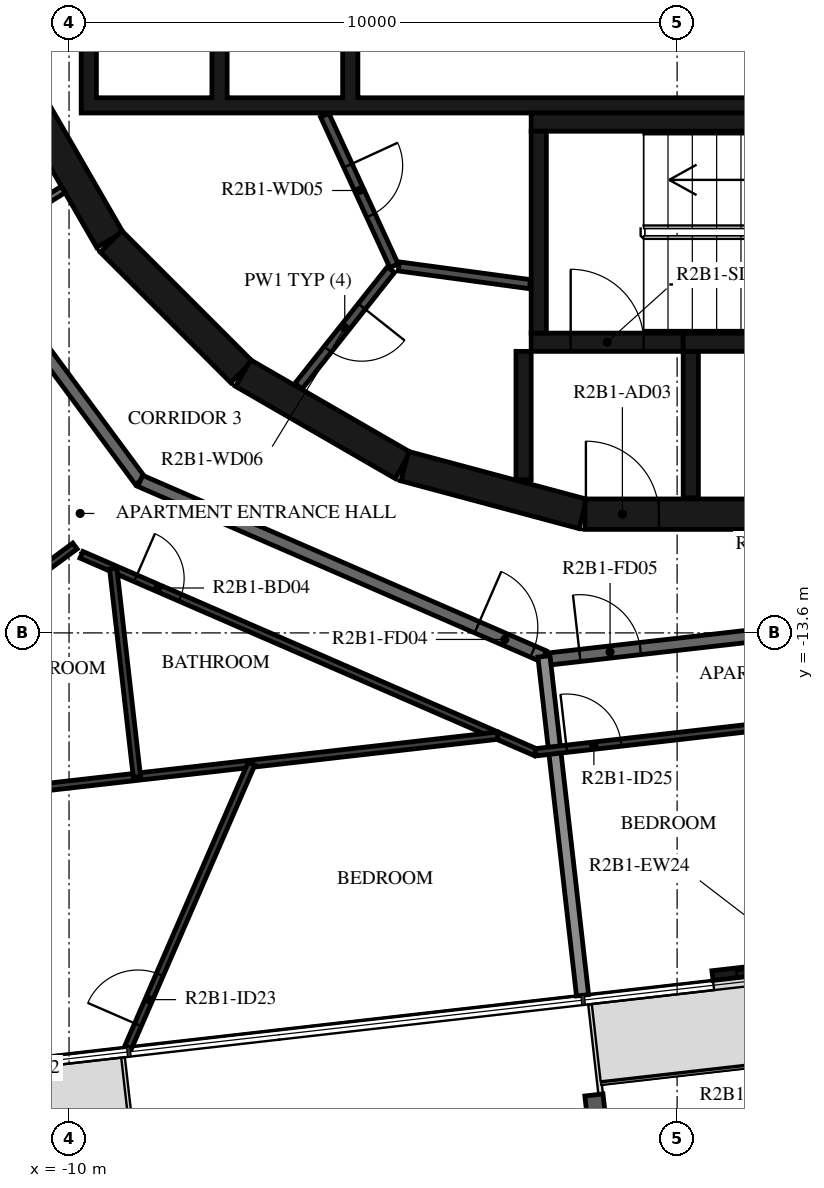
"""IFC4 building model, lengths in metres.
Left out: names, types, materials, properties, quantities, classifications, styles, units other than length and angle.
Written with IfcOpenShell. Run it as: python <this file> out.ifc"""

import sys

from ifc_helpers import new_model, si_unit, direction, frame, frame_2d, origin, origin_2d, place, context, subcontext, project, spatial, polyline, rectangle, i_section, outline, extrude, element, fill, save


model = new_model("IFC4")
c1 = context("Model", 3, precision=1e-05, world=origin(), true_north=direction((0.0, 1.0)))
c2 = subcontext(c1, "Body", "Model", "MODEL_VIEW")
j1 = project(units=[si_unit("LENGTHUNIT", "METRE"), si_unit("PLANEANGLEUNIT", "RADIAN")], contexts=[c1])
p1 = place(None, origin())
s1 = spatial("IfcSite", under=j1, at=p1, CompositionType="ELEMENT")
p2 = place(p1, origin())
s2 = spatial("IfcBuilding", under=s1, at=p2, CompositionType="ELEMENT")
p3 = place(p2, frame((0.0, 0.0, 87.2)))
s3 = spatial("IfcBuildingStorey", under=s2, at=p3, CompositionType="ELEMENT", Elevation=87.2)
p4 = place(p3, frame((-1.317, -21.646, -0.38), z_axis=(0.0, 0.0, 1.0), x_axis=(-0.993571881569, -0.113202986513, 0.0)))
e1 = element("IfcColumn", 1, at=p4, inside=s3, PredefinedType="COLUMN", context=c2, shape_type="SweptSolid", body=[
    extrude(i_section(OverallWidth=0.3, OverallDepth=0.9, WebThickness=0.019, FlangeThickness=0.035, FilletRadius=0.03, at=origin_2d()), origin(), (0.0, 0.0, 1.0), 3.5),
])
p5 = place(p3, frame((0.581, -19.235, 0.0), z_axis=(0.0, 0.0, 1.0), x_axis=(0.993569997097, 0.113219525124, 0.0)))
e2 = element("IfcWall", 2, at=p5, inside=s3, PredefinedType="STANDARD", context=c2, shape_type="SweptSolid", body=[
    extrude(rectangle(XDim=3.2, YDim=0.16, at=frame_2d((1.6, 0.0))), origin(), (0.0, 0.0, 1.0), 3.12),
])
p6 = place(p5, frame((0.4, 0.0, 0.0)))
e3 = element("IfcOpeningElement", 3, at=p6, cuts=e2, PredefinedType="OPENING", context=c2, shape_type="SweptSolid", body=[
    extrude(rectangle(XDim=2.4, YDim=2.4, at=frame_2d((1.2, 1.2))), frame((0.0, 0.09, 0.0), z_axis=(0.0, -1.0, 0.0), x_axis=(1.0, 0.0, 0.0)), (0.0, 0.0, 1.0), 0.18),
])
p7 = place(p3, frame((-10.845, -4.51, 0.0), z_axis=(0.0, 0.0, 1.0), x_axis=(0.500087131594, -0.865975092491, 0.0)))
e4 = element("IfcWall", 4, at=p7, inside=s3, PredefinedType="SHEAR", context=c2, shape_type="SweptSolid", body=[
    extrude(rectangle(XDim=3.033, YDim=0.5, at=frame_2d((1.516, 0.0))), origin(), (0.0, 0.0, 1.0), 3.12),
])
p8 = place(p3, frame((-9.308, -7.164, 0.0), z_axis=(0.0, 0.0, 1.0), x_axis=(0.707106781187, -0.707106781187, 0.0)))
e5 = element("IfcWall", 5, at=p8, inside=s3, PredefinedType="SHEAR", context=c2, shape_type="SweptSolid", body=[
    extrude(rectangle(XDim=3.032, YDim=0.5, at=frame_2d((1.516, 0.0))), origin(), (0.0, 0.0, 1.0), 3.12),
])
for number, where, z_axis, x_axis in (
    (6, (-7.137, -9.329, 0.0), (0.0, 0.0, 1.0), (0.866, -0.5, 0.0)),
    (7, (-4.479, -10.858, 0.0), (0.0, 0.0, 1.0), (0.966, -0.259, 0.0)),
):
    element("IfcWall", number, at=place(p3, frame(where, z_axis=z_axis, x_axis=x_axis)), inside=s3, PredefinedType="SHEAR", context=c2, shape_type="SweptSolid", body=[
        extrude(rectangle(XDim=3.033, YDim=0.5, at=frame_2d((1.516, 0.0))), origin(), (0.0, 0.0, 1.0), 3.12),
    ])
p9 = place(p3, frame((-1.516, -11.647, 0.0), z_axis=(0.0, 0.0, 1.0), x_axis=(1.0, 0.0, 0.0)))
e8 = element("IfcWall", 8, at=p9, inside=s3, PredefinedType="SHEAR", context=c2, shape_type="SweptSolid", body=[
    extrude(rectangle(XDim=3.033, YDim=0.5, at=frame_2d((1.516, 0.0))), origin(), (0.0, 0.0, 1.0), 3.12),
])
p10 = place(p9, frame((0.016, 0.0, 0.0)))
e9 = element("IfcOpeningElement", 9, at=p10, cuts=e8, PredefinedType="OPENING", context=c2, shape_type="SweptSolid", body=[
    extrude(rectangle(XDim=1.2, YDim=2.1, at=frame_2d((0.6, 1.05))), frame((0.0, 0.26, 0.0), z_axis=(0.0, -1.0, 0.0), x_axis=(1.0, 0.0, 0.0)), (0.0, 0.0, 1.0), 0.52),
])
p11 = place(p3, frame((-2.275, -8.67, 0.0), z_axis=(0.0, 0.0, 1.0), x_axis=(0.0, 1.0, 0.0)))
e10 = element("IfcWall", 10, at=p11, inside=s3, PredefinedType="SHEAR", context=c2, shape_type="SweptSolid", body=[
    extrude(rectangle(XDim=3.32, YDim=0.25, at=frame_2d((1.66, 0.0))), origin(), (0.0, 0.0, 1.0), 3.12),
])
p12 = place(p3, frame((-2.4, -5.2, 0.0), z_axis=(0.0, 0.0, 1.0), x_axis=(1.0, 0.0, 0.0)))
e11 = element("IfcWall", 11, at=p12, inside=s3, PredefinedType="SHEAR", context=c2, shape_type="SweptSolid", body=[
    extrude(rectangle(XDim=7.05, YDim=0.3, at=frame_2d((3.525, 0.0))), origin(), (0.0, 0.0, 1.0), 3.12),
])
p13 = place(p3, frame((0.1, -8.82, 0.0), z_axis=(0.0, 0.0, 1.0), x_axis=(1.0, 0.0, 0.0)))
e12 = element("IfcWall", 12, at=p13, inside=s3, PredefinedType="SHEAR", context=c2, shape_type="SweptSolid", body=[
    extrude(rectangle(XDim=4.55, YDim=0.3, at=frame_2d((2.275, 0.0))), origin(), (0.0, 0.0, 1.0), 3.12),
])
p14 = place(p3, frame((-2.4, -8.82, 0.0), z_axis=(0.0, 0.0, 1.0), x_axis=(1.0, 0.0, 0.0)))
e13 = element("IfcWall", 13, at=p14, inside=s3, PredefinedType="SHEAR", context=c2, shape_type="SweptSolid", body=[
    extrude(rectangle(XDim=2.5, YDim=0.3, at=frame_2d((1.25, 0.0))), origin(), (0.0, 0.0, 1.0), 3.12),
])
p15 = place(p14, frame((0.65, 0.0, 0.0)))
e14 = element("IfcOpeningElement", 14, at=p15, cuts=e13, PredefinedType="OPENING", context=c2, shape_type="SweptSolid", body=[
    extrude(rectangle(XDim=1.2, YDim=2.1, at=frame_2d((0.6, 1.05))), frame((0.0, 0.16, 0.0), z_axis=(0.0, -1.0, 0.0), x_axis=(1.0, 0.0, 0.0)), (0.0, 0.0, 1.0), 0.32),
])
p16 = place(p3, frame((-2.525, -8.97, 0.0), z_axis=(0.0, 0.0, 1.0), x_axis=(0.0, -1.0, 0.0)))
e15 = element("IfcWall", 15, at=p16, inside=s3, PredefinedType="SHEAR", context=c2, shape_type="SweptSolid", body=[
    extrude(rectangle(XDim=2.11, YDim=0.25, at=frame_2d((1.055, 0.0))), origin(), (0.0, 0.0, 1.0), 3.12),
])
p17 = place(p3, frame((0.225, -8.97, 0.0), z_axis=(0.0, 0.0, 1.0), x_axis=(0.0, -1.0, 0.0)))
e16 = element("IfcWall", 16, at=p17, inside=s3, PredefinedType="SHEAR", context=c2, shape_type="SweptSolid", body=[
    extrude(rectangle(XDim=2.41, YDim=0.25, at=frame_2d((1.205, 0.0))), origin(), (0.0, 0.0, 1.0), 3.12),
])
p18 = place(p3, origin())
e17 = element("IfcWall", 17, at=p18, inside=s3, PredefinedType="SHEAR", context=c2, shape_type="SweptSolid", body=[
    extrude(outline(polyline([(9.8, -5.05), (9.8, -4.8), (9.8, -1.9), (9.55, -1.9), (9.55, -4.8), (7.65, -4.8), (7.65, -1.9), (7.4, -1.9), (7.4, -4.8), (5.5, -4.8), (5.5, -1.9), (5.25, -1.9), (5.25, -4.8), (3.35, -4.8), (3.35, -1.9), (3.1, -1.9), (3.1, -4.8), (-5.25, -4.8), (-5.25, -1.9), (-5.5, -1.9), (-5.5, -4.8), (-7.4, -4.8), (-7.4, -1.9), (-7.65, -1.9), (-7.65, -4.8), (-9.55, -4.8), (-9.55, -1.9), (-9.8, -1.9), (-9.8, -4.8), (-9.8, -5.05), (9.8, -5.05)])), origin(), (0.0, 0.0, 1.0), 3.12),
])
p19 = place(p3, frame((-5.795, -5.086, 0.0), z_axis=(0.0, 0.0, 1.0), x_axis=(0.417887867606, -0.908498613157, 0.0)))
e18 = element("IfcWall", 18, at=p19, inside=s3, PredefinedType="PARTITIONING", context=c2, shape_type="SweptSolid", body=[
    extrude(rectangle(XDim=2.726, YDim=0.15, at=frame_2d((1.363, 0.0))), origin(), (0.0, 0.0, 1.0), 3.12),
])
p20 = place(p19, frame((0.913, 0.0, 0.0)))
e19 = element("IfcOpeningElement", 19, at=p20, cuts=e18, PredefinedType="OPENING", context=c2, shape_type="SweptSolid", body=[
    extrude(rectangle(XDim=0.9, YDim=2.1, at=frame_2d((0.45, 1.05))), frame((0.0, 0.085, 0.0), z_axis=(0.0, -1.0, 0.0), x_axis=(1.0, 0.0, 0.0)), (0.0, 0.0, 1.0), 0.17),
])
p21 = place(p3, frame((-4.706, -7.625, 0.0), z_axis=(0.0, 0.0, 1.0), x_axis=(-0.621392599334, -0.783499353856, 0.0)))
e20 = element("IfcWall", 20, at=p21, inside=s3, PredefinedType="PARTITIONING", context=c2, shape_type="SweptSolid", body=[
    extrude(rectangle(XDim=2.447, YDim=0.15, at=frame_2d((1.224, 0.0))), origin(), (0.0, 0.0, 1.0), 3.12),
])
p22 = place(p21, frame((0.774, 0.0, 0.0)))
e21 = element("IfcOpeningElement", 21, at=p22, cuts=e20, PredefinedType="OPENING", context=c2, shape_type="SweptSolid", body=[
    extrude(rectangle(XDim=0.9, YDim=2.1, at=frame_2d((0.45, 1.05))), frame((0.0, 0.085, 0.0), z_axis=(0.0, -1.0, 0.0), x_axis=(1.0, 0.0, 0.0)), (0.0, 0.0, 1.0), 0.17),
])
p23 = place(p3, frame((-2.42, -7.865, 0.0), z_axis=(0.0, 0.0, 1.0), x_axis=(-0.990972299108, 0.134066783362, 0.0)))
e22 = element("IfcWall", 22, at=p23, inside=s3, PredefinedType="PARTITIONING", context=c2, shape_type="SweptSolid", body=[
    extrude(rectangle(XDim=2.176, YDim=0.15, at=frame_2d((1.088, 0.0))), origin(), (0.0, 0.0, 1.0), 3.12),
])
p24 = place(p3, frame((-11.654, -7.282, 0.0), z_axis=(0.0, 0.0, 1.0), x_axis=(0.848117698675, 0.529807860638, 0.0)))
e23 = element("IfcWall", 23, at=p24, inside=s3, PredefinedType="PARTITIONING", context=c2, shape_type="SweptSolid", body=[
    extrude(rectangle(XDim=1.838, YDim=0.12, at=frame_2d((0.919, 0.0))), origin(), (0.0, 0.0, 1.0), 3.12),
])
p25 = place(p24, frame((0.115, 0.0, 0.0)))
e24 = element("IfcOpeningElement", 24, at=p25, cuts=e23, PredefinedType="OPENING", context=c2, shape_type="SweptSolid", body=[
    extrude(rectangle(XDim=1.2, YDim=2.1, at=frame_2d((0.6, 1.05))), frame((0.0, 0.07, 0.0), z_axis=(0.0, -1.0, 0.0), x_axis=(1.0, 0.0, 0.0)), (0.0, 0.0, 1.0), 0.14),
])
p26 = place(p3, frame((-13.196, -5.198, 0.0), z_axis=(0.0, 0.0, 1.0), x_axis=(0.594805187394, -0.803869883159, 0.0)))
e25 = element("IfcWall", 25, at=p26, inside=s3, PredefinedType="STANDARD", context=c2, shape_type="SweptSolid", body=[
    extrude(rectangle(XDim=7.342, YDim=0.2, at=frame_2d((3.671, 0.0))), origin(), (0.0, 0.0, 1.0), 3.12),
])
p27 = place(p3, frame((-8.829, -11.1, 0.0), z_axis=(0.0, 0.0, 1.0), x_axis=(0.917063622491, -0.398740908742, 0.0)))
e26 = element("IfcWall", 26, at=p27, inside=s3, PredefinedType="STANDARD", context=c2, shape_type="SweptSolid", body=[
    extrude(rectangle(XDim=7.24, YDim=0.2, at=frame_2d((3.62, 0.0))), origin(), (0.0, 0.0, 1.0), 3.12),
])
p28 = place(p27, frame((6.04, 0.0, 0.0)))
e27 = element("IfcOpeningElement", 27, at=p28, cuts=e26, PredefinedType="OPENING", context=c2, shape_type="SweptSolid", body=[
    extrude(rectangle(XDim=1.0, YDim=2.1, at=frame_2d((0.5, 1.05))), frame((0.0, 0.11, 0.0), z_axis=(0.0, -1.0, 0.0), x_axis=(1.0, 0.0, 0.0)), (0.0, 0.0, 1.0), 0.22),
])
p29 = place(p3, frame((-2.096, -14.028, 0.0), z_axis=(0.0, 0.0, 1.0), x_axis=(0.993569170114, 0.113226782163, 0.0)))
e28 = element("IfcWall", 28, at=p29, inside=s3, PredefinedType="STANDARD", context=c2, shape_type="SweptSolid", body=[
    extrude(rectangle(XDim=7.342, YDim=0.2, at=frame_2d((3.671, 0.0))), origin(), (0.0, 0.0, 1.0), 3.12),
])
p30 = place(p29, frame((0.5, 0.0, 0.0)))
e29 = element("IfcOpeningElement", 29, at=p30, cuts=e28, PredefinedType="OPENING", context=c2, shape_type="SweptSolid", body=[
    extrude(rectangle(XDim=1.0, YDim=2.1, at=frame_2d((0.5, 1.05))), frame((0.0, 0.11, 0.0), z_axis=(0.0, -1.0, 0.0), x_axis=(1.0, 0.0, 0.0)), (0.0, 0.0, 1.0), 0.22),
])
p31 = place(p3, frame((-1.555, -19.559, 0.0), z_axis=(0.0, 0.0, 1.0), x_axis=(-0.113221250863, 0.993569800443, 0.0)))
e30 = element("IfcWall", 30, at=p31, inside=s3, PredefinedType="STANDARD", context=c2, shape_type="SweptSolid", body=[
    extrude(rectangle(XDim=5.609, YDim=0.2, at=frame_2d((2.804, 0.0))), origin(), (0.0, 0.0, 1.0), 2.73),
])
p32 = place(p3, frame((-13.125, -14.555, 0.0), z_axis=(0.0, 0.0, 1.0), x_axis=(0.80389374229, 0.594772940799, 0.0)))
e31 = element("IfcWall", 31, at=p32, inside=s3, PredefinedType="PARTITIONING", context=c2, shape_type="SweptSolid", body=[
    extrude(rectangle(XDim=4.008, YDim=0.12, at=frame_2d((2.004, 0.0))), origin(), (0.0, 0.0, 1.0), 3.12),
])
p33 = place(p3, frame((-9.796, -12.315, 0.0), z_axis=(0.0, 0.0, 1.0), x_axis=(0.917059572812, -0.398750222463, 0.0)))
e32 = element("IfcWall", 32, at=p33, inside=s3, PredefinedType="PARTITIONING", context=c2, shape_type="SweptSolid", body=[
    extrude(rectangle(XDim=8.146, YDim=0.12, at=frame_2d((4.073, 0.0))), origin(), (0.0, 0.0, 1.0), 3.12),
])
p34 = place(p33, frame((0.969, 0.0, 0.0)))
e33 = element("IfcOpeningElement", 33, at=p34, cuts=e32, PredefinedType="OPENING", context=c2, shape_type="SweptSolid", body=[
    extrude(rectangle(XDim=0.8, YDim=2.1, at=frame_2d((0.4, 1.05))), frame((0.0, 0.07, 0.0), z_axis=(0.0, -1.0, 0.0), x_axis=(1.0, 0.0, 0.0)), (0.0, 0.0, 1.0), 0.14),
])
p35 = place(p3, frame((-2.326, -15.563, 0.0), z_axis=(0.0, 0.0, 1.0), x_axis=(0.993575068384, 0.113175012641, 0.0)))
e34 = element("IfcWall", 34, at=p35, inside=s3, PredefinedType="PARTITIONING", context=c2, shape_type="SweptSolid", body=[
    extrude(rectangle(XDim=3.799, YDim=0.12, at=frame_2d((1.899, 0.0))), origin(), (0.0, 0.0, 1.0), 3.12),
])
p36 = place(p35, frame((0.513, 0.0, 0.0)))
e35 = element("IfcOpeningElement", 35, at=p36, cuts=e34, PredefinedType="OPENING", context=c2, shape_type="SweptSolid", body=[
    extrude(rectangle(XDim=0.9, YDim=2.1, at=frame_2d((0.45, 1.05))), frame((0.0, 0.07, 0.0), z_axis=(0.0, -1.0, 0.0), x_axis=(1.0, 0.0, 0.0)), (0.0, 0.0, 1.0), 0.14),
])
p37 = place(p3, frame((-17.437, -16.94, 0.0), z_axis=(0.0, 0.0, 1.0), x_axis=(0.993573314119, 0.113190412448, 0.0)))
e36 = element("IfcWall", 36, at=p37, inside=s3, PredefinedType="PARTITIONING", context=c2, shape_type="SweptSolid", body=[
    extrude(rectangle(XDim=14.576, YDim=0.12, at=frame_2d((7.288, 0.0))), origin(), (0.0, 0.0, 1.0), 3.12),
])
p38 = place(p37, frame((3.201, 0.0, 0.0)))
e37 = element("IfcOpeningElement", 37, at=p38, cuts=e36, PredefinedType="OPENING", context=c2, shape_type="SweptSolid", body=[
    extrude(rectangle(XDim=0.9, YDim=2.1, at=frame_2d((0.45, 1.05))), frame((0.0, 0.07, 0.0), z_axis=(0.0, -1.0, 0.0), x_axis=(1.0, 0.0, 0.0)), (0.0, 0.0, 1.0), 0.14),
])
p39 = place(p37, frame((0.2, 0.0, 0.0)))
e38 = element("IfcOpeningElement", 38, at=p39, cuts=e36, PredefinedType="OPENING", context=c2, shape_type="SweptSolid", body=[
    extrude(rectangle(XDim=0.9, YDim=2.1, at=frame_2d((0.45, 1.05))), frame((0.0, 0.07, 0.0), z_axis=(0.0, -1.0, 0.0), x_axis=(1.0, 0.0, 0.0)), (0.0, 0.0, 1.0), 0.14),
])
p40 = place(p3, frame((-8.884, -15.966, 0.0), z_axis=(0.0, 0.0, 1.0), x_axis=(-0.113230836929, 0.993568708026, 0.0)))
e39 = element("IfcWall", 39, at=p40, inside=s3, PredefinedType="PARTITIONING", context=c2, shape_type="SweptSolid", body=[
    extrude(rectangle(XDim=3.446, YDim=0.12, at=frame_2d((1.723, 0.0))), origin(), (0.0, 0.0, 1.0), 3.12),
])
p41 = place(p3, frame((-9.026, -20.41, 0.0), z_axis=(0.0, 0.0, 1.0), x_axis=(0.398750711167, 0.917059360316, 0.0)))
e40 = element("IfcWall", 40, at=p41, inside=s3, PredefinedType="PARTITIONING", context=c2, shape_type="SweptSolid", body=[
    extrude(rectangle(XDim=5.081, YDim=0.12, at=frame_2d((2.54, 0.0))), origin(), (0.0, 0.0, 1.0), 3.12),
])
p42 = place(p41, frame((0.4, 0.0, 0.0)))
e41 = element("IfcOpeningElement", 41, at=p42, cuts=e40, PredefinedType="OPENING", context=c2, shape_type="SweptSolid", body=[
    extrude(rectangle(XDim=0.9, YDim=2.1, at=frame_2d((0.45, 1.05))), frame((0.0, 0.07, 0.0), z_axis=(0.0, -1.0, 0.0), x_axis=(1.0, 0.0, 0.0)), (0.0, 0.0, 1.0), 0.14),
])
p43 = place(p6, origin())
e42 = element("IfcDoor", 42, at=p43, inside=s3, OperationType="DOUBLE_DOOR_SLIDING", PredefinedType="DOOR", context=c2, shape_type="SweptSolid", body=[
    extrude(rectangle(XDim=2.4, YDim=2.4, at=frame_2d((1.2, 1.2))), frame((0.0, 0.025, 0.0), z_axis=(0.0, -1.0, 0.0), x_axis=(1.0, 0.0, 0.0)), (0.0, 0.0, 1.0), 0.05),
])
fill(e3, e42)
p44 = place(p15, origin())
e43 = element("IfcDoor", 43, at=p44, inside=s3, OperationType="SINGLE_SWING_LEFT", PredefinedType="DOOR", context=c2, shape_type="SweptSolid", body=[
    extrude(rectangle(XDim=1.2, YDim=2.1, at=frame_2d((0.6, 1.05))), frame((0.0, 0.025, 0.0), z_axis=(0.0, -1.0, 0.0), x_axis=(1.0, 0.0, 0.0)), (0.0, 0.0, 1.0), 0.05),
])
fill(e14, e43)
p45 = place(p10, origin())
e44 = element("IfcDoor", 44, at=p45, inside=s3, OperationType="SINGLE_SWING_RIGHT", PredefinedType="DOOR", context=c2, shape_type="SweptSolid", body=[
    extrude(rectangle(XDim=1.2, YDim=2.1, at=frame_2d((0.6, 1.05))), frame((0.0, 0.025, 0.0), z_axis=(0.0, -1.0, 0.0), x_axis=(1.0, 0.0, 0.0)), (0.0, 0.0, 1.0), 0.05),
])
fill(e9, e44)
p46 = place(p20, origin())
e45 = element("IfcDoor", 45, at=p46, inside=s3, OperationType="SINGLE_SWING_RIGHT", PredefinedType="DOOR", context=c2, shape_type="SweptSolid", body=[
    extrude(rectangle(XDim=0.9, YDim=2.1, at=frame_2d((0.45, 1.05))), frame((0.0, 0.025, 0.0), z_axis=(0.0, -1.0, 0.0), x_axis=(1.0, 0.0, 0.0)), (0.0, 0.0, 1.0), 0.05),
])
fill(e19, e45)
p47 = place(p22, origin())
e46 = element("IfcDoor", 46, at=p47, inside=s3, OperationType="SINGLE_SWING_LEFT", PredefinedType="DOOR", context=c2, shape_type="SweptSolid", body=[
    extrude(rectangle(XDim=0.9, YDim=2.1, at=frame_2d((0.45, 1.05))), frame((0.0, 0.025, 0.0), z_axis=(0.0, -1.0, 0.0), x_axis=(1.0, 0.0, 0.0)), (0.0, 0.0, 1.0), 0.05),
])
fill(e21, e46)
p48 = place(p28, origin())
e47 = element("IfcDoor", 47, at=p48, inside=s3, OperationType="SINGLE_SWING_LEFT", PredefinedType="DOOR", context=c2, shape_type="SweptSolid", body=[
    extrude(rectangle(XDim=1.0, YDim=2.1, at=frame_2d((0.5, 1.05))), frame((0.0, 0.025, 0.0), z_axis=(0.0, -1.0, 0.0), x_axis=(1.0, 0.0, 0.0)), (0.0, 0.0, 1.0), 0.05),
])
fill(e27, e47)
p49 = place(p34, origin())
e48 = element("IfcDoor", 48, at=p49, inside=s3, OperationType="SINGLE_SWING_LEFT", PredefinedType="DOOR", context=c2, shape_type="SweptSolid", body=[
    extrude(rectangle(XDim=0.8, YDim=2.1, at=frame_2d((0.4, 1.05))), frame((0.0, 0.025, 0.0), z_axis=(0.0, -1.0, 0.0), x_axis=(1.0, 0.0, 0.0)), (0.0, 0.0, 1.0), 0.05),
])
fill(e33, e48)
p50 = place(p42, origin())
e49 = element("IfcDoor", 49, at=p50, inside=s3, OperationType="SINGLE_SWING_RIGHT", PredefinedType="DOOR", context=c2, shape_type="SweptSolid", body=[
    extrude(rectangle(XDim=0.9, YDim=2.1, at=frame_2d((0.45, 1.05))), frame((0.0, 0.025, 0.0), z_axis=(0.0, -1.0, 0.0), x_axis=(1.0, 0.0, 0.0)), (0.0, 0.0, 1.0), 0.05),
])
fill(e41, e49)
p51 = place(p30, origin())
e50 = element("IfcDoor", 50, at=p51, inside=s3, OperationType="SINGLE_SWING_LEFT", PredefinedType="DOOR", context=c2, shape_type="SweptSolid", body=[
    extrude(rectangle(XDim=1.0, YDim=2.1, at=frame_2d((0.5, 1.05))), frame((0.0, 0.025, 0.0), z_axis=(0.0, -1.0, 0.0), x_axis=(1.0, 0.0, 0.0)), (0.0, 0.0, 1.0), 0.05),
])
fill(e29, e50)
p52 = place(p36, origin())
e51 = element("IfcDoor", 51, at=p52, inside=s3, OperationType="SINGLE_SWING_LEFT", PredefinedType="DOOR", context=c2, shape_type="SweptSolid", body=[
    extrude(rectangle(XDim=0.9, YDim=2.1, at=frame_2d((0.45, 1.05))), frame((0.0, 0.025, 0.0), z_axis=(0.0, -1.0, 0.0), x_axis=(1.0, 0.0, 0.0)), (0.0, 0.0, 1.0), 0.05),
])
fill(e35, e51)
save(model, sys.argv[1])
